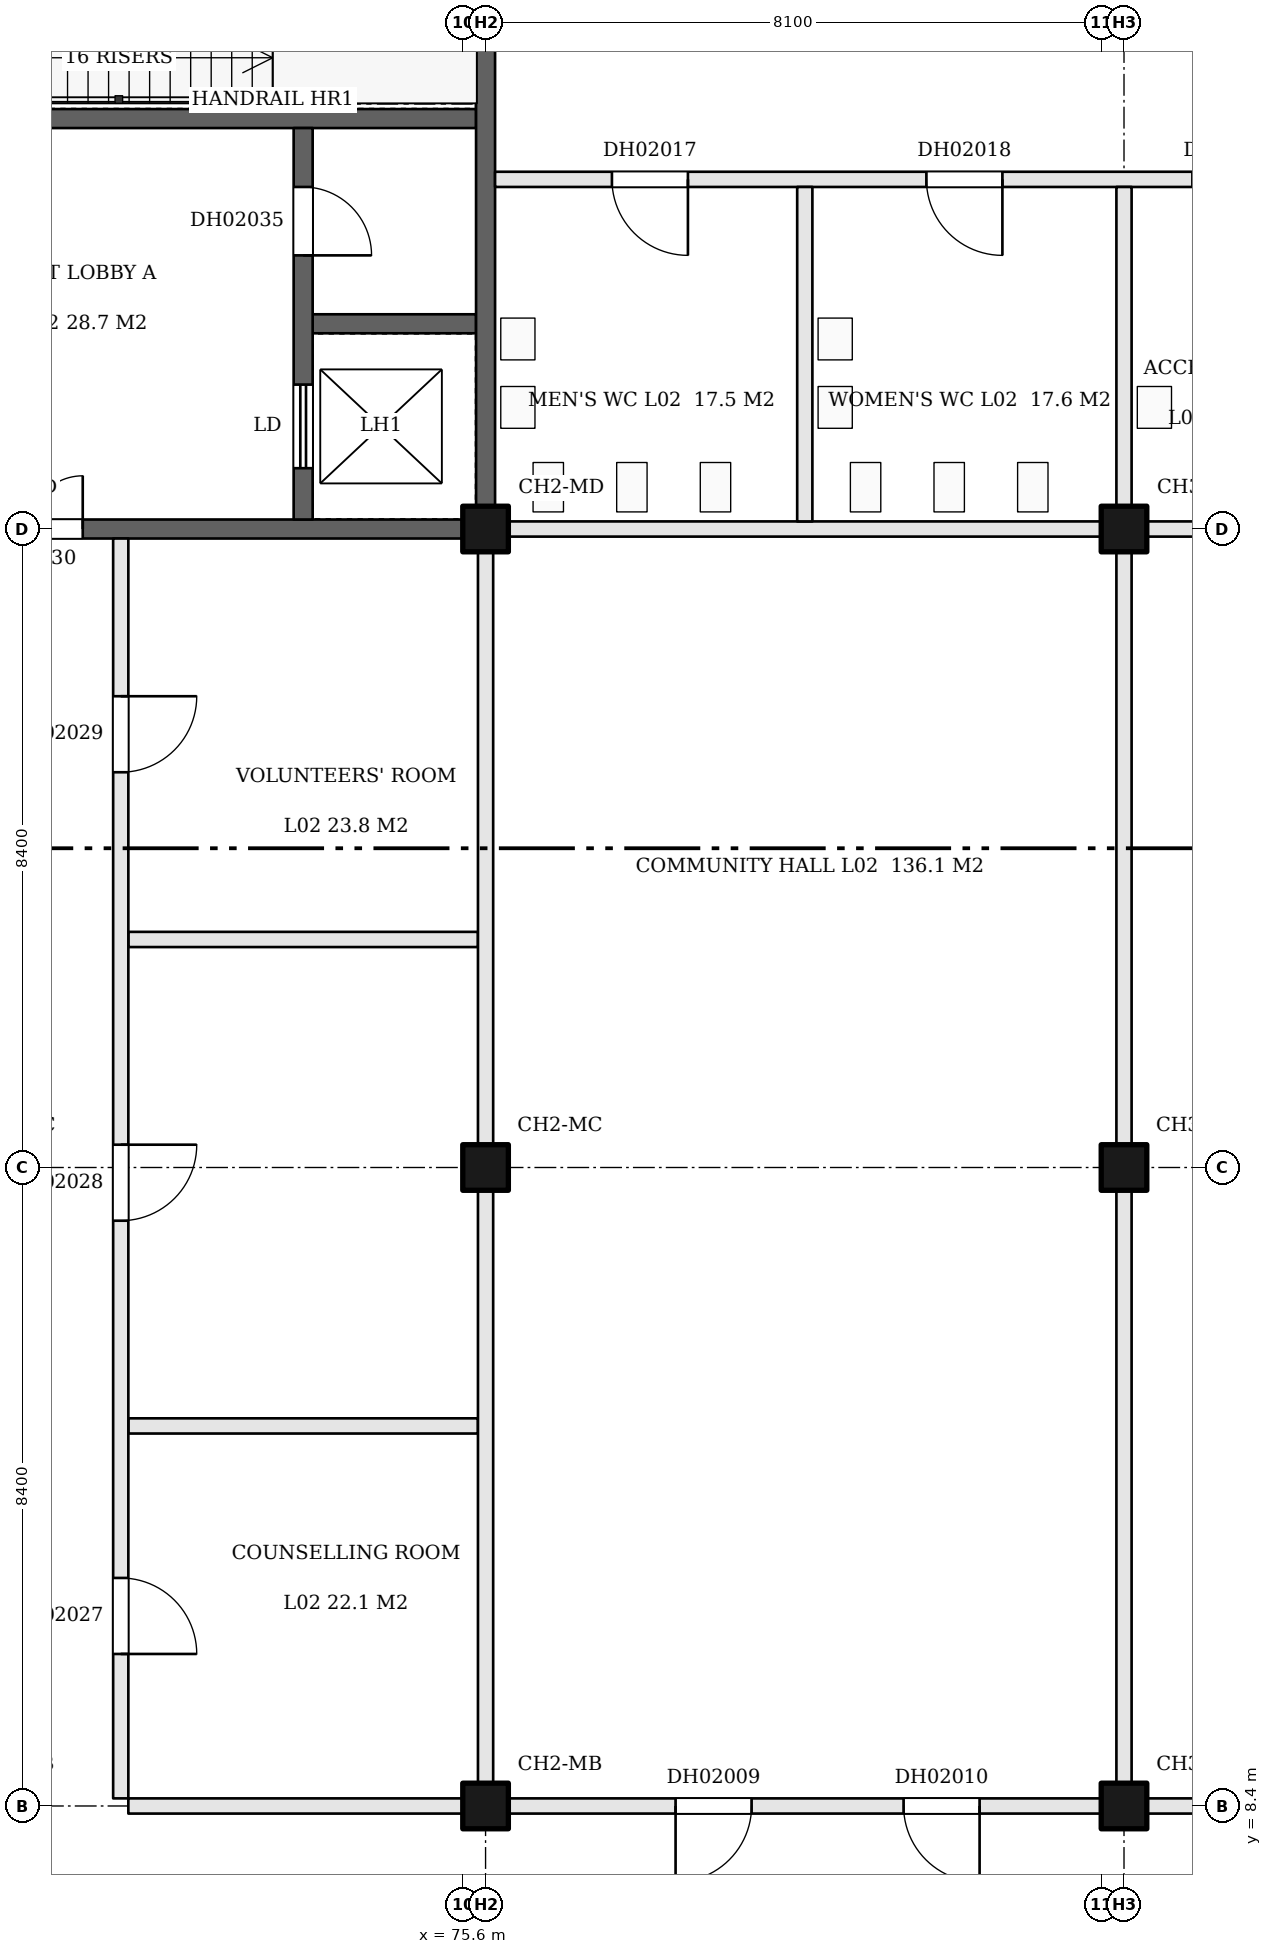
"""IFC4 building model, lengths in metres.
Left out: names, types, materials, properties, quantities, classifications, styles, units other than length and angle.
Written with IfcOpenShell. Run it as: python <this file> out.ifc"""

import sys

from ifc_helpers import new_model, si_unit, direction, frame, frame_2d, origin, origin_2d, place, context, subcontext, project, spatial, rectangle, extrude, element, fill, save


model = new_model("IFC4")
c1 = context("Model", 3, precision=1e-05, world=origin(), true_north=direction((0.0, 1.0)))
c2 = subcontext(c1, "Body", "Model", "MODEL_VIEW")
j1 = project(units=[si_unit("LENGTHUNIT", "METRE"), si_unit("PLANEANGLEUNIT", "RADIAN")], contexts=[c1])
p1 = place(None, origin())
s1 = spatial("IfcSite", under=j1, at=p1, CompositionType="ELEMENT")
p2 = place(p1, origin())
s2 = spatial("IfcBuilding", under=s1, at=p2, CompositionType="ELEMENT")
p3 = place(p2, frame((0.0, 0.0, 14.4)))
s3 = spatial("IfcBuildingStorey", under=s2, at=p3, CompositionType="ELEMENT", Elevation=14.4)
for number, where, z_axis, x_axis in (
    (1, (75.9, 8.4, 0.0), (0.0, 0.0, 1.0), (1.0, 0.0, 0.0)),
    (2, (75.9, 16.8, 0.0), (0.0, 0.0, 1.0), (1.0, 0.0, 0.0)),
    (3, (75.9, 25.2, 0.0), (0.0, 0.0, 1.0), (1.0, 0.0, 0.0)),
    (4, (84.3, 8.4, 0.0), (0.0, 0.0, 1.0), (1.0, 0.0, 0.0)),
    (5, (84.3, 16.8, 0.0), (0.0, 0.0, 1.0), (1.0, 0.0, 0.0)),
    (6, (84.3, 25.2, 0.0), (0.0, 0.0, 1.0), (1.0, 0.0, 0.0)),
):
    element("IfcColumn", number, at=place(p3, frame(where, z_axis=z_axis, x_axis=x_axis)), inside=s3, PredefinedType="COLUMN", context=c2, shape_type="SweptSolid", body=[
        extrude(rectangle(XDim=0.6, YDim=0.6, at=origin_2d()), origin(), (0.0, 0.0, 1.0), 5.1),
    ])
p4 = place(p3, frame((71.2, 8.4, 0.0), z_axis=(0.0, 0.0, 1.0), x_axis=(1.0, 0.0, 0.0)))
e7 = element("IfcWall", 7, at=p4, inside=s3, PredefinedType="PARTITIONING", context=c2, shape_type="SweptSolid", body=[
    extrude(rectangle(XDim=4.4, YDim=0.2, at=frame_2d((2.2, 0.0))), origin(), (0.0, 0.0, 1.0), 5.1),
])
p5 = place(p3, frame((76.2, 8.4, 0.0), z_axis=(0.0, 0.0, 1.0), x_axis=(1.0, 0.0, 0.0)))
e8 = element("IfcWall", 8, at=p5, inside=s3, PredefinedType="PARTITIONING", context=c2, shape_type="SweptSolid", body=[
    extrude(rectangle(XDim=7.8, YDim=0.2, at=frame_2d((3.9, 0.0))), origin(), (0.0, 0.0, 1.0), 5.1),
])
p6 = place(p5, frame((2.2, 0.0, 0.0)))
e9 = element("IfcOpeningElement", 9, at=p6, cuts=e8, PredefinedType="OPENING", context=c2, shape_type="SweptSolid", body=[
    extrude(rectangle(XDim=1.0, YDim=2.1, at=frame_2d((0.5, 1.05))), frame((0.0, 0.11, 0.0), z_axis=(0.0, -1.0, 0.0), x_axis=(1.0, 0.0, 0.0)), (0.0, 0.0, 1.0), 0.22),
])
p7 = place(p5, frame((5.2, 0.0, 0.0)))
e10 = element("IfcOpeningElement", 10, at=p7, cuts=e8, PredefinedType="OPENING", context=c2, shape_type="SweptSolid", body=[
    extrude(rectangle(XDim=1.0, YDim=2.1, at=frame_2d((0.5, 1.05))), frame((0.0, 0.11, 0.0), z_axis=(0.0, -1.0, 0.0), x_axis=(1.0, 0.0, 0.0)), (0.0, 0.0, 1.0), 0.22),
])
p8 = place(p3, frame((84.6, 8.4, 0.0), z_axis=(0.0, 0.0, 1.0), x_axis=(1.0, 0.0, 0.0)))
e11 = element("IfcWall", 11, at=p8, inside=s3, PredefinedType="PARTITIONING", context=c2, shape_type="SweptSolid", body=[
    extrude(rectangle(XDim=7.8, YDim=0.2, at=frame_2d((3.9, 0.0))), origin(), (0.0, 0.0, 1.0), 5.1),
])
p9 = place(p8, frame((2.2, 0.0, 0.0)))
e12 = element("IfcOpeningElement", 12, at=p9, cuts=e11, PredefinedType="OPENING", context=c2, shape_type="SweptSolid", body=[
    extrude(rectangle(XDim=1.0, YDim=2.1, at=frame_2d((0.5, 1.05))), frame((0.0, 0.11, 0.0), z_axis=(0.0, -1.0, 0.0), x_axis=(1.0, 0.0, 0.0)), (0.0, 0.0, 1.0), 0.22),
])
p10 = place(p8, frame((5.2, 0.0, 0.0)))
e13 = element("IfcOpeningElement", 13, at=p10, cuts=e11, PredefinedType="OPENING", context=c2, shape_type="SweptSolid", body=[
    extrude(rectangle(XDim=1.0, YDim=2.1, at=frame_2d((0.5, 1.05))), frame((0.0, 0.11, 0.0), z_axis=(0.0, -1.0, 0.0), x_axis=(1.0, 0.0, 0.0)), (0.0, 0.0, 1.0), 0.22),
])
for number, where, z_axis, x_axis in (
    (14, (71.2, 13.4, 0.0), (0.0, 0.0, 1.0), (1.0, 0.0, 0.0)),
    (15, (71.2, 19.8, 0.0), (0.0, 0.0, 1.0), (1.0, 0.0, 0.0)),
):
    element("IfcWall", number, at=place(p3, frame(where, z_axis=z_axis, x_axis=x_axis)), inside=s3, PredefinedType="PARTITIONING", context=c2, shape_type="SweptSolid", body=[
        extrude(rectangle(XDim=4.6, YDim=0.2, at=frame_2d((2.3, 0.0))), origin(), (0.0, 0.0, 1.0), 5.1),
    ])
p11 = place(p3, frame((69.0, 25.2, 0.0), z_axis=(0.0, 0.0, 1.0), x_axis=(1.0, 0.0, 0.0)))
e16 = element("IfcWall", 16, at=p11, inside=s3, PredefinedType="SHEAR", context=c2, shape_type="SweptSolid", body=[
    extrude(rectangle(XDim=6.6, YDim=0.25, at=frame_2d((3.3, 0.0))), origin(), (0.0, 0.0, 1.0), 5.1),
])
p12 = place(p11, frame((0.2, 0.0, 0.0)))
e17 = element("IfcOpeningElement", 17, at=p12, cuts=e16, PredefinedType="OPENING", context=c2, shape_type="SweptSolid", body=[
    extrude(rectangle(XDim=1.4, YDim=2.1, at=frame_2d((0.7, 1.05))), frame((0.0, 0.135, 0.0), z_axis=(0.0, -1.0, 0.0), x_axis=(1.0, 0.0, 0.0)), (0.0, 0.0, 1.0), 0.27),
])
p13 = place(p3, frame((76.2, 25.2, 0.0), z_axis=(0.0, 0.0, 1.0), x_axis=(1.0, 0.0, 0.0)))
e18 = element("IfcWall", 18, at=p13, inside=s3, PredefinedType="PARTITIONING", context=c2, shape_type="SweptSolid", body=[
    extrude(rectangle(XDim=7.8, YDim=0.2, at=frame_2d((3.9, 0.0))), origin(), (0.0, 0.0, 1.0), 5.1),
])
p14 = place(p3, frame((84.6, 25.2, 0.0), z_axis=(0.0, 0.0, 1.0), x_axis=(1.0, 0.0, 0.0)))
e19 = element("IfcWall", 19, at=p14, inside=s3, PredefinedType="PARTITIONING", context=c2, shape_type="SweptSolid", body=[
    extrude(rectangle(XDim=7.8, YDim=0.2, at=frame_2d((3.9, 0.0))), origin(), (0.0, 0.0, 1.0), 5.1),
])
p15 = place(p3, frame((73.625, 27.9, 0.0), z_axis=(0.0, 0.0, 1.0), x_axis=(1.0, 0.0, 0.0)))
e20 = element("IfcWall", 20, at=p15, inside=s3, PredefinedType="SHEAR", context=c2, shape_type="SweptSolid", body=[
    extrude(rectangle(XDim=2.15, YDim=0.25, at=frame_2d((1.075, 0.0))), origin(), (0.0, 0.0, 1.0), 5.1),
])
p16 = place(p3, frame((76.025, 29.8, 0.0), z_axis=(0.0, 0.0, 1.0), x_axis=(1.0, 0.0, 0.0)))
e21 = element("IfcWall", 21, at=p16, inside=s3, PredefinedType="PARTITIONING", context=c2, shape_type="SweptSolid", body=[
    extrude(rectangle(XDim=33.375, YDim=0.2, at=frame_2d((16.688, 0.0))), origin(), (0.0, 0.0, 1.0), 5.1),
])
p17 = place(p16, frame((1.538, 0.0, 0.0)))
e22 = element("IfcOpeningElement", 22, at=p17, cuts=e21, PredefinedType="OPENING", context=c2, shape_type="SweptSolid", body=[
    extrude(rectangle(XDim=1.0, YDim=2.1, at=frame_2d((0.5, 1.05))), frame((0.0, 0.11, 0.0), z_axis=(0.0, -1.0, 0.0), x_axis=(1.0, 0.0, 0.0)), (0.0, 0.0, 1.0), 0.22),
])
p18 = place(p16, frame((5.675, 0.0, 0.0)))
e23 = element("IfcOpeningElement", 23, at=p18, cuts=e21, PredefinedType="OPENING", context=c2, shape_type="SweptSolid", body=[
    extrude(rectangle(XDim=1.0, YDim=2.1, at=frame_2d((0.5, 1.05))), frame((0.0, 0.11, 0.0), z_axis=(0.0, -1.0, 0.0), x_axis=(1.0, 0.0, 0.0)), (0.0, 0.0, 1.0), 0.22),
])
p19 = place(p16, frame((9.175, 0.0, 0.0)))
e24 = element("IfcOpeningElement", 24, at=p19, cuts=e21, PredefinedType="OPENING", context=c2, shape_type="SweptSolid", body=[
    extrude(rectangle(XDim=1.0, YDim=2.1, at=frame_2d((0.5, 1.05))), frame((0.0, 0.11, 0.0), z_axis=(0.0, -1.0, 0.0), x_axis=(1.0, 0.0, 0.0)), (0.0, 0.0, 1.0), 0.22),
])
p20 = place(p16, frame((14.775, 0.0, 0.0)))
e25 = element("IfcOpeningElement", 25, at=p20, cuts=e21, PredefinedType="OPENING", context=c2, shape_type="SweptSolid", body=[
    extrude(rectangle(XDim=1.0, YDim=2.1, at=frame_2d((0.5, 1.05))), frame((0.0, 0.11, 0.0), z_axis=(0.0, -1.0, 0.0), x_axis=(1.0, 0.0, 0.0)), (0.0, 0.0, 1.0), 0.22),
])
p21 = place(p16, frame((22.475, 0.0, 0.0)))
e26 = element("IfcOpeningElement", 26, at=p21, cuts=e21, PredefinedType="OPENING", context=c2, shape_type="SweptSolid", body=[
    extrude(rectangle(XDim=1.0, YDim=2.1, at=frame_2d((0.5, 1.05))), frame((0.0, 0.11, 0.0), z_axis=(0.0, -1.0, 0.0), x_axis=(1.0, 0.0, 0.0)), (0.0, 0.0, 1.0), 0.22),
])
p22 = place(p16, frame((29.475, 0.0, 0.0)))
e27 = element("IfcOpeningElement", 27, at=p22, cuts=e21, PredefinedType="OPENING", context=c2, shape_type="SweptSolid", body=[
    extrude(rectangle(XDim=1.0, YDim=2.1, at=frame_2d((0.5, 1.05))), frame((0.0, 0.11, 0.0), z_axis=(0.0, -1.0, 0.0), x_axis=(1.0, 0.0, 0.0)), (0.0, 0.0, 1.0), 0.22),
])
p23 = place(p3, frame((67.8, 30.6, 0.0), z_axis=(0.0, 0.0, 1.0), x_axis=(1.0, 0.0, 0.0)))
e28 = element("IfcWall", 28, at=p23, inside=s3, PredefinedType="SHEAR", context=c2, shape_type="SweptSolid", body=[
    extrude(rectangle(XDim=7.975, YDim=0.25, at=frame_2d((3.987, 0.0))), origin(), (0.0, 0.0, 1.0), 5.1),
])
p24 = place(p23, frame((0.2, 0.0, 0.0)))
e29 = element("IfcOpeningElement", 29, at=p24, cuts=e28, PredefinedType="OPENING", context=c2, shape_type="SweptSolid", body=[
    extrude(rectangle(XDim=1.0, YDim=2.1, at=frame_2d((0.5, 1.05))), frame((0.0, 0.135, 0.0), z_axis=(0.0, -1.0, 0.0), x_axis=(1.0, 0.0, 0.0)), (0.0, 0.0, 1.0), 0.27),
])
p25 = place(p3, frame((71.1, 8.5, 0.0), z_axis=(0.0, 0.0, 1.0), x_axis=(0.0, 1.0, 0.0)))
e30 = element("IfcWall", 30, at=p25, inside=s3, PredefinedType="PARTITIONING", context=c2, shape_type="SweptSolid", body=[
    extrude(rectangle(XDim=16.575, YDim=0.2, at=frame_2d((8.288, 0.0))), origin(), (0.0, 0.0, 1.0), 5.1),
])
p26 = place(p25, frame((1.9, 0.0, 0.0)))
e31 = element("IfcOpeningElement", 31, at=p26, cuts=e30, PredefinedType="OPENING", context=c2, shape_type="SweptSolid", body=[
    extrude(rectangle(XDim=1.0, YDim=2.1, at=frame_2d((0.5, 1.05))), frame((0.0, 0.11, 0.0), z_axis=(0.0, -1.0, 0.0), x_axis=(1.0, 0.0, 0.0)), (0.0, 0.0, 1.0), 0.22),
])
p27 = place(p25, frame((7.6, 0.0, 0.0)))
e32 = element("IfcOpeningElement", 32, at=p27, cuts=e30, PredefinedType="OPENING", context=c2, shape_type="SweptSolid", body=[
    extrude(rectangle(XDim=1.0, YDim=2.1, at=frame_2d((0.5, 1.05))), frame((0.0, 0.11, 0.0), z_axis=(0.0, -1.0, 0.0), x_axis=(1.0, 0.0, 0.0)), (0.0, 0.0, 1.0), 0.22),
])
p28 = place(p25, frame((13.5, 0.0, 0.0)))
e33 = element("IfcOpeningElement", 33, at=p28, cuts=e30, PredefinedType="OPENING", context=c2, shape_type="SweptSolid", body=[
    extrude(rectangle(XDim=1.0, YDim=2.1, at=frame_2d((0.5, 1.05))), frame((0.0, 0.11, 0.0), z_axis=(0.0, -1.0, 0.0), x_axis=(1.0, 0.0, 0.0)), (0.0, 0.0, 1.0), 0.22),
])
p29 = place(p3, frame((73.5, 25.325, 0.0), z_axis=(0.0, 0.0, 1.0), x_axis=(0.0, 1.0, 0.0)))
e34 = element("IfcWall", 34, at=p29, inside=s3, PredefinedType="SHEAR", context=c2, shape_type="SweptSolid", body=[
    extrude(rectangle(XDim=5.15, YDim=0.25, at=frame_2d((2.575, 0.0))), origin(), (0.0, 0.0, 1.0), 5.1),
])
p30 = place(p29, frame((0.675, 0.0, 0.0)))
e35 = element("IfcOpeningElement", 35, at=p30, cuts=e34, PredefinedType="OPENING", context=c2, shape_type="SweptSolid", body=[
    extrude(rectangle(XDim=1.1, YDim=2.1, at=frame_2d((0.55, 1.05))), frame((0.0, 0.135, 0.0), z_axis=(0.0, -1.0, 0.0), x_axis=(1.0, 0.0, 0.0)), (0.0, 0.0, 1.0), 0.27),
])
p31 = place(p29, frame((3.475, 0.0, 0.0)))
e36 = element("IfcOpeningElement", 36, at=p31, cuts=e34, PredefinedType="OPENING", context=c2, shape_type="SweptSolid", body=[
    extrude(rectangle(XDim=0.9, YDim=2.1, at=frame_2d((0.45, 1.05))), frame((0.0, 0.135, 0.0), z_axis=(0.0, -1.0, 0.0), x_axis=(1.0, 0.0, 0.0)), (0.0, 0.0, 1.0), 0.27),
])
p32 = place(p3, frame((75.9, 8.7, 0.0), z_axis=(0.0, 0.0, 1.0), x_axis=(0.0, 1.0, 0.0)))
e37 = element("IfcWall", 37, at=p32, inside=s3, PredefinedType="PARTITIONING", context=c2, shape_type="SweptSolid", body=[
    extrude(rectangle(XDim=7.8, YDim=0.2, at=frame_2d((3.9, 0.0))), origin(), (0.0, 0.0, 1.0), 5.1),
])
p33 = place(p3, frame((75.9, 17.1, 0.0), z_axis=(0.0, 0.0, 1.0), x_axis=(0.0, 1.0, 0.0)))
e38 = element("IfcWall", 38, at=p33, inside=s3, PredefinedType="PARTITIONING", context=c2, shape_type="SweptSolid", body=[
    extrude(rectangle(XDim=7.8, YDim=0.2, at=frame_2d((3.9, 0.0))), origin(), (0.0, 0.0, 1.0), 5.1),
])
p34 = place(p3, frame((75.9, 25.5, 0.0), z_axis=(0.0, 0.0, 1.0), x_axis=(0.0, 1.0, 0.0)))
e39 = element("IfcWall", 39, at=p34, inside=s3, PredefinedType="SHEAR", context=c2, shape_type="SweptSolid", body=[
    extrude(rectangle(XDim=7.2, YDim=0.25, at=frame_2d((3.6, 0.0))), origin(), (0.0, 0.0, 1.0), 5.1),
])
p35 = place(p3, frame((80.1, 25.3, 0.0), z_axis=(0.0, 0.0, 1.0), x_axis=(0.0, 1.0, 0.0)))
e40 = element("IfcWall", 40, at=p35, inside=s3, PredefinedType="PARTITIONING", context=c2, shape_type="SweptSolid", body=[
    extrude(rectangle(XDim=4.4, YDim=0.2, at=frame_2d((2.2, 0.0))), origin(), (0.0, 0.0, 1.0), 5.1),
])
p36 = place(p3, frame((84.3, 8.7, 0.0), z_axis=(0.0, 0.0, 1.0), x_axis=(0.0, 1.0, 0.0)))
e41 = element("IfcWall", 41, at=p36, inside=s3, PredefinedType="PARTITIONING", context=c2, shape_type="SweptSolid", body=[
    extrude(rectangle(XDim=7.8, YDim=0.2, at=frame_2d((3.9, 0.0))), origin(), (0.0, 0.0, 1.0), 5.1),
])
p37 = place(p3, frame((84.3, 17.1, 0.0), z_axis=(0.0, 0.0, 1.0), x_axis=(0.0, 1.0, 0.0)))
e42 = element("IfcWall", 42, at=p37, inside=s3, PredefinedType="PARTITIONING", context=c2, shape_type="SweptSolid", body=[
    extrude(rectangle(XDim=7.8, YDim=0.2, at=frame_2d((3.9, 0.0))), origin(), (0.0, 0.0, 1.0), 5.1),
])
p38 = place(p3, frame((84.3, 25.5, 0.0), z_axis=(0.0, 0.0, 1.0), x_axis=(0.0, 1.0, 0.0)))
e43 = element("IfcWall", 43, at=p38, inside=s3, PredefinedType="PARTITIONING", context=c2, shape_type="SweptSolid", body=[
    extrude(rectangle(XDim=4.2, YDim=0.2, at=frame_2d((2.1, 0.0))), origin(), (0.0, 0.0, 1.0), 5.1),
])
p39 = place(p6, frame((1.0, 0.0, 0.0), z_axis=(0.0, 0.0, 1.0), x_axis=(-1.0, 0.0, 0.0)))
e44 = element("IfcDoor", 44, at=p39, inside=s3, OperationType="SINGLE_SWING_RIGHT", PredefinedType="DOOR", context=c2, shape_type="SweptSolid", body=[
    extrude(rectangle(XDim=1.0, YDim=2.1, at=frame_2d((0.5, 1.05))), frame((0.0, 0.025, 0.0), z_axis=(0.0, -1.0, 0.0), x_axis=(1.0, 0.0, 0.0)), (0.0, 0.0, 1.0), 0.05),
])
fill(e9, e44)
p40 = place(p7, frame((1.0, 0.0, 0.0), z_axis=(0.0, 0.0, 1.0), x_axis=(-1.0, 0.0, 0.0)))
e45 = element("IfcDoor", 45, at=p40, inside=s3, OperationType="SINGLE_SWING_LEFT", PredefinedType="DOOR", context=c2, shape_type="SweptSolid", body=[
    extrude(rectangle(XDim=1.0, YDim=2.1, at=frame_2d((0.5, 1.05))), frame((0.0, 0.025, 0.0), z_axis=(0.0, -1.0, 0.0), x_axis=(1.0, 0.0, 0.0)), (0.0, 0.0, 1.0), 0.05),
])
fill(e10, e45)
p41 = place(p17, frame((1.0, 0.0, 0.0), z_axis=(0.0, 0.0, 1.0), x_axis=(-1.0, 0.0, 0.0)))
e46 = element("IfcDoor", 46, at=p41, inside=s3, OperationType="SINGLE_SWING_LEFT", PredefinedType="DOOR", context=c2, shape_type="SweptSolid", body=[
    extrude(rectangle(XDim=1.0, YDim=2.1, at=frame_2d((0.5, 1.05))), frame((0.0, 0.025, 0.0), z_axis=(0.0, -1.0, 0.0), x_axis=(1.0, 0.0, 0.0)), (0.0, 0.0, 1.0), 0.05),
])
fill(e22, e46)
p42 = place(p18, frame((1.0, 0.0, 0.0), z_axis=(0.0, 0.0, 1.0), x_axis=(-1.0, 0.0, 0.0)))
e47 = element("IfcDoor", 47, at=p42, inside=s3, OperationType="SINGLE_SWING_LEFT", PredefinedType="DOOR", context=c2, shape_type="SweptSolid", body=[
    extrude(rectangle(XDim=1.0, YDim=2.1, at=frame_2d((0.5, 1.05))), frame((0.0, 0.025, 0.0), z_axis=(0.0, -1.0, 0.0), x_axis=(1.0, 0.0, 0.0)), (0.0, 0.0, 1.0), 0.05),
])
fill(e23, e47)
p43 = place(p26, frame((1.0, 0.0, 0.0), z_axis=(0.0, 0.0, 1.0), x_axis=(-1.0, 0.0, 0.0)))
e48 = element("IfcDoor", 48, at=p43, inside=s3, OperationType="SINGLE_SWING_RIGHT", PredefinedType="DOOR", context=c2, shape_type="SweptSolid", body=[
    extrude(rectangle(XDim=1.0, YDim=2.1, at=frame_2d((0.5, 1.05))), frame((0.0, 0.025, 0.0), z_axis=(0.0, -1.0, 0.0), x_axis=(1.0, 0.0, 0.0)), (0.0, 0.0, 1.0), 0.05),
])
fill(e31, e48)
p44 = place(p27, frame((1.0, 0.0, 0.0), z_axis=(0.0, 0.0, 1.0), x_axis=(-1.0, 0.0, 0.0)))
e49 = element("IfcDoor", 49, at=p44, inside=s3, OperationType="SINGLE_SWING_LEFT", PredefinedType="DOOR", context=c2, shape_type="SweptSolid", body=[
    extrude(rectangle(XDim=1.0, YDim=2.1, at=frame_2d((0.5, 1.05))), frame((0.0, 0.025, 0.0), z_axis=(0.0, -1.0, 0.0), x_axis=(1.0, 0.0, 0.0)), (0.0, 0.0, 1.0), 0.05),
])
fill(e32, e49)
p45 = place(p28, frame((1.0, 0.0, 0.0), z_axis=(0.0, 0.0, 1.0), x_axis=(-1.0, 0.0, 0.0)))
e50 = element("IfcDoor", 50, at=p45, inside=s3, OperationType="SINGLE_SWING_LEFT", PredefinedType="DOOR", context=c2, shape_type="SweptSolid", body=[
    extrude(rectangle(XDim=1.0, YDim=2.1, at=frame_2d((0.5, 1.05))), frame((0.0, 0.025, 0.0), z_axis=(0.0, -1.0, 0.0), x_axis=(1.0, 0.0, 0.0)), (0.0, 0.0, 1.0), 0.05),
])
fill(e33, e50)
p46 = place(p12, origin())
e51 = element("IfcDoor", 51, at=p46, inside=s3, OperationType="DOUBLE_DOOR_SINGLE_SWING", PredefinedType="DOOR", context=c2, shape_type="SweptSolid", body=[
    extrude(rectangle(XDim=1.4, YDim=2.1, at=frame_2d((0.7, 1.05))), frame((0.0, 0.025, 0.0), z_axis=(0.0, -1.0, 0.0), x_axis=(1.0, 0.0, 0.0)), (0.0, 0.0, 1.0), 0.05),
])
fill(e17, e51)
p47 = place(p30, origin())
e52 = element("IfcDoor", 52, at=p47, inside=s3, OperationType="SLIDING_TO_LEFT", PredefinedType="DOOR", context=c2, shape_type="SweptSolid", body=[
    extrude(rectangle(XDim=1.1, YDim=2.1, at=frame_2d((0.55, 1.05))), frame((0.0, 0.025, 0.0), z_axis=(0.0, -1.0, 0.0), x_axis=(1.0, 0.0, 0.0)), (0.0, 0.0, 1.0), 0.05),
])
fill(e35, e52)
p48 = place(p31, frame((0.9, 0.0, 0.0), z_axis=(0.0, 0.0, 1.0), x_axis=(-1.0, 0.0, 0.0)))
e53 = element("IfcDoor", 53, at=p48, inside=s3, OperationType="SINGLE_SWING_RIGHT", PredefinedType="DOOR", context=c2, shape_type="SweptSolid", body=[
    extrude(rectangle(XDim=0.9, YDim=2.1, at=frame_2d((0.45, 1.05))), frame((0.0, 0.025, 0.0), z_axis=(0.0, -1.0, 0.0), x_axis=(1.0, 0.0, 0.0)), (0.0, 0.0, 1.0), 0.05),
])
fill(e36, e53)
save(model, sys.argv[1])
